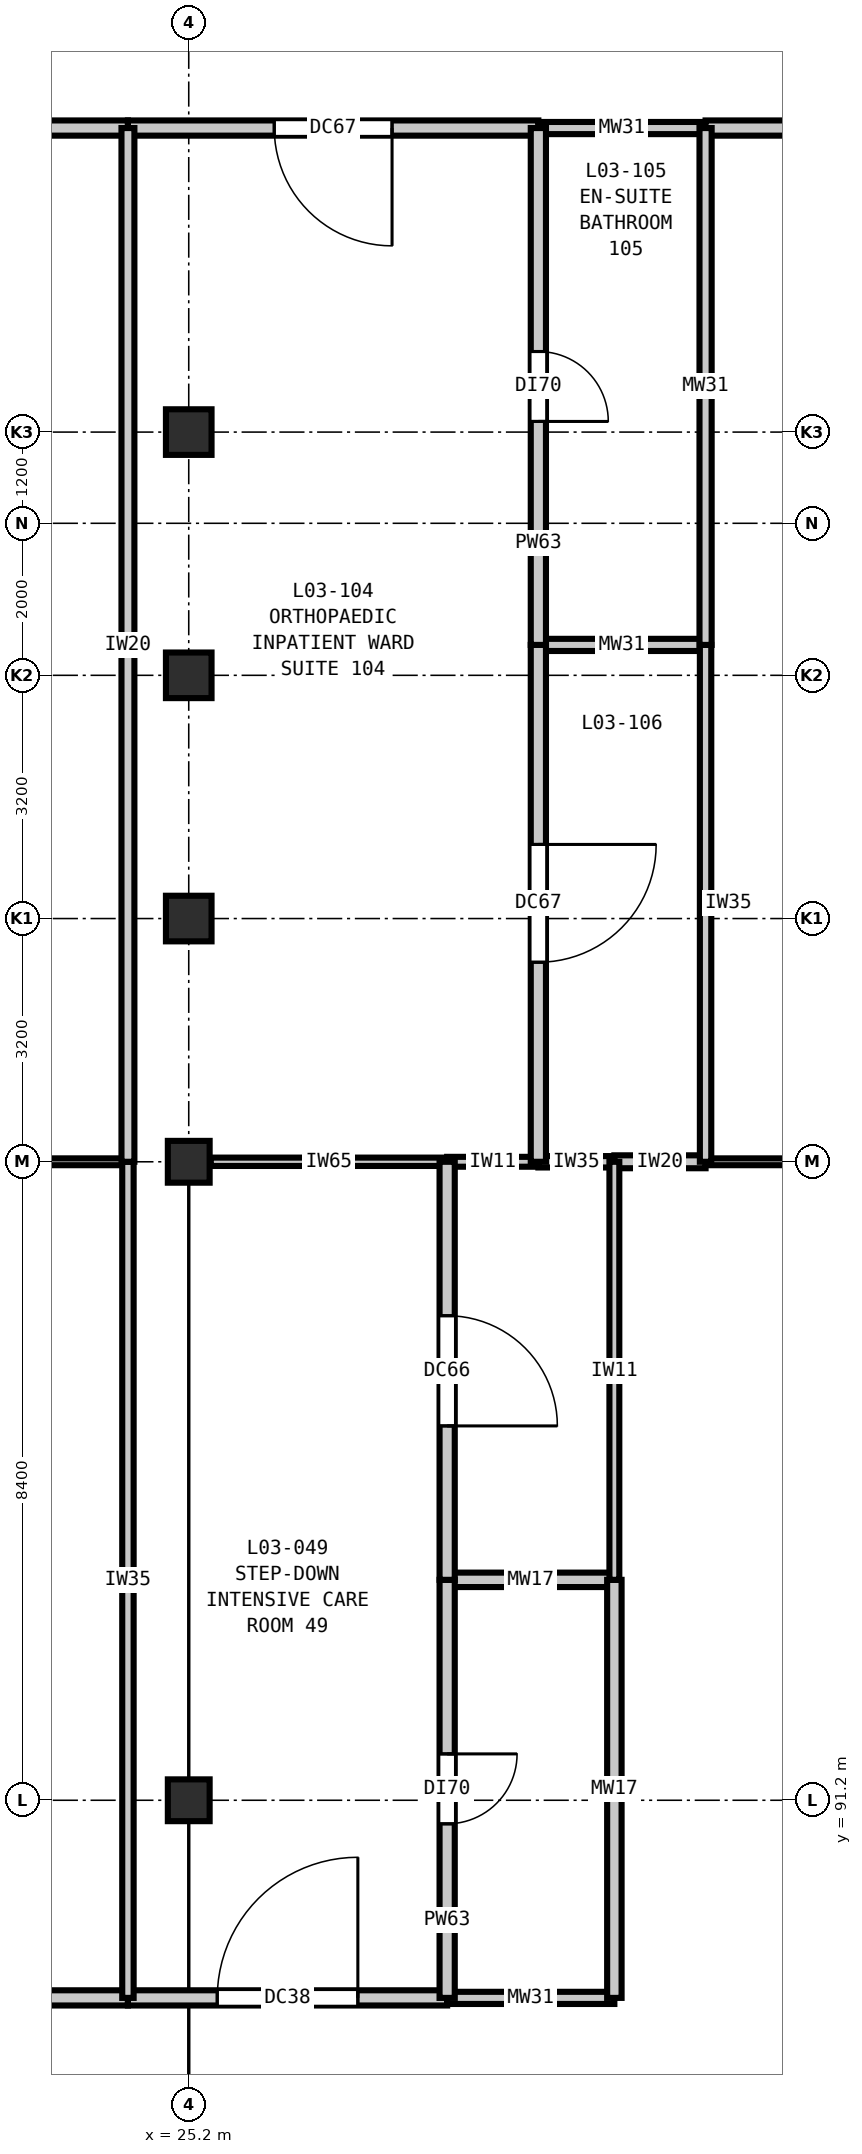
"""IFC4 building model, lengths in metres.
Left out: names, types, materials, properties, quantities, classifications, styles, units other than length and angle.
Written with IfcOpenShell. Run it as: python <this file> out.ifc"""

import sys

from ifc_helpers import new_model, si_unit, direction, frame, frame_2d, origin, origin_2d, place, context, subcontext, project, spatial, rectangle, extrude, element, fill, save


model = new_model("IFC4")
c1 = context("Model", 3, precision=1e-05, world=origin(), true_north=direction((0.0, 1.0)))
c2 = subcontext(c1, "Body", "Model", "MODEL_VIEW")
j1 = project(units=[si_unit("LENGTHUNIT", "METRE"), si_unit("PLANEANGLEUNIT", "RADIAN")], contexts=[c1])
p1 = place(None, origin())
s1 = spatial("IfcSite", under=j1, at=p1, CompositionType="ELEMENT")
p2 = place(p1, origin())
s2 = spatial("IfcBuilding", under=s1, at=p2, CompositionType="ELEMENT")
p3 = place(p2, frame((0.0, 0.0, 16.2)))
s3 = spatial("IfcBuildingStorey", under=s2, at=p3, CompositionType="ELEMENT", Elevation=16.2)
for number, where, z_axis, x_axis in (
    (1, (25.2, 91.2, 0.0), (0.0, 0.0, 1.0), (1.0, 0.0, 0.0)),
    (2, (25.2, 99.6, 0.0), (0.0, 0.0, 1.0), (1.0, 0.0, 0.0)),
):
    element("IfcColumn", number, at=place(p3, frame(where, z_axis=z_axis, x_axis=x_axis)), inside=s3, PredefinedType="COLUMN", context=c2, shape_type="SweptSolid", body=[
        extrude(rectangle(XDim=0.55, YDim=0.55, at=origin_2d()), origin(), (0.0, 0.0, 1.0), 4.2),
    ])
for number, where, z_axis, x_axis in (
    (3, (25.2, 102.8, 0.0), (0.0, 0.0, 1.0), (1.0, 0.0, 0.0)),
    (4, (25.2, 106.0, 0.0), (0.0, 0.0, 1.0), (1.0, 0.0, 0.0)),
    (5, (25.2, 109.2, 0.0), (0.0, 0.0, 1.0), (1.0, 0.0, 0.0)),
):
    element("IfcColumn", number, at=place(p3, frame(where, z_axis=z_axis, x_axis=x_axis)), inside=s3, PredefinedType="COLUMN", context=c2, shape_type="SweptSolid", body=[
        extrude(rectangle(XDim=0.6, YDim=0.6, at=origin_2d()), origin(), (0.0, 0.0, 1.0), 4.2),
    ])
p4 = place(p3, frame((16.0, 88.6, 0.0), z_axis=(0.0, 0.0, 1.0), x_axis=(1.0, 0.0, 0.0)))
e6 = element("IfcWall", 6, at=p4, inside=s3, PredefinedType="PARTITIONING", context=c2, shape_type="SweptSolid", body=[
    extrude(rectangle(XDim=8.4, YDim=0.2, at=frame_2d((4.2, 0.0))), origin(), (0.0, 0.0, 1.0), 3.89),
])
p5 = place(p4, frame((3.35, 0.0, 0.0)))
e7 = element("IfcOpeningElement", 7, at=p5, cuts=e6, PredefinedType="OPENING", context=c2, shape_type="SweptSolid", body=[
    extrude(rectangle(XDim=1.7, YDim=2.3, at=frame_2d((0.85, 1.15))), frame((0.0, 0.11, 0.0), z_axis=(0.0, -1.0, 0.0), x_axis=(1.0, 0.0, 0.0)), (0.0, 0.0, 1.0), 0.22),
])
p6 = place(p3, frame((24.4, 88.6, 0.0), z_axis=(0.0, 0.0, 1.0), x_axis=(1.0, 0.0, 0.0)))
e8 = element("IfcWall", 8, at=p6, inside=s3, PredefinedType="PARTITIONING", context=c2, shape_type="SweptSolid", body=[
    extrude(rectangle(XDim=4.2, YDim=0.2, at=frame_2d((2.1, 0.0))), origin(), (0.0, 0.0, 1.0), 3.89),
])
p7 = place(p6, frame((1.175, 0.0, 0.0)))
e9 = element("IfcOpeningElement", 9, at=p7, cuts=e8, PredefinedType="OPENING", context=c2, shape_type="SweptSolid", body=[
    extrude(rectangle(XDim=1.85, YDim=2.3, at=frame_2d((0.925, 1.15))), frame((0.0, 0.11, 0.0), z_axis=(0.0, -1.0, 0.0), x_axis=(1.0, 0.0, 0.0)), (0.0, 0.0, 1.0), 0.22),
])
p8 = place(p3, frame((28.6, 88.6, 0.0), z_axis=(0.0, 0.0, 1.0), x_axis=(1.0, 0.0, 0.0)))
e10 = element("IfcWall", 10, at=p8, inside=s3, PredefinedType="PLUMBINGWALL", context=c2, shape_type="SweptSolid", body=[
    extrude(rectangle(XDim=2.2, YDim=0.16, at=frame_2d((1.1, 0.0))), origin(), (0.0, 0.0, 1.0), 3.89),
])
p9 = place(p3, frame((28.6, 94.1, 0.0), z_axis=(0.0, 0.0, 1.0), x_axis=(1.0, 0.0, 0.0)))
e11 = element("IfcWall", 11, at=p9, inside=s3, PredefinedType="PLUMBINGWALL", context=c2, shape_type="SweptSolid", body=[
    extrude(rectangle(XDim=2.2, YDim=0.19, at=frame_2d((1.1, 0.0))), origin(), (0.0, 0.0, 1.0), 3.89),
])
p10 = place(p3, frame((17.115, 99.6, 0.0), z_axis=(0.0, 0.0, 1.0), x_axis=(1.0, 0.0, 0.0)))
e12 = element("IfcWall", 12, at=p10, inside=s3, PredefinedType="PARTITIONING", context=c2, shape_type="SweptSolid", body=[
    extrude(rectangle(XDim=7.285, YDim=0.09, at=frame_2d((3.643, 0.0))), origin(), (0.0, 0.0, 1.0), 3.535),
])
p11 = place(p3, frame((25.49, 99.6, 0.0), z_axis=(0.0, 0.0, 1.0), x_axis=(1.0, 0.0, 0.0)))
e13 = element("IfcWall", 13, at=p11, inside=s3, PredefinedType="PARTITIONING", context=c2, shape_type="SweptSolid", body=[
    extrude(rectangle(XDim=3.11, YDim=0.11, at=frame_2d((1.555, 0.0))), origin(), (0.0, 0.0, 1.0), 3.535),
])
p12 = place(p3, frame((28.6, 99.6, 0.0), z_axis=(0.0, 0.0, 1.0), x_axis=(1.0, 0.0, 0.0)))
e14 = element("IfcWall", 14, at=p12, inside=s3, PredefinedType="PARTITIONING", context=c2, shape_type="SweptSolid", body=[
    extrude(rectangle(XDim=1.2, YDim=0.13, at=frame_2d((0.6, 0.0))), origin(), (0.0, 0.0, 1.0), 3.535),
])
p13 = place(p3, frame((29.8, 99.6, 0.0), z_axis=(0.0, 0.0, 1.0), x_axis=(1.0, 0.0, 0.0)))
e15 = element("IfcWall", 15, at=p13, inside=s3, PredefinedType="PARTITIONING", context=c2, shape_type="SweptSolid", body=[
    extrude(rectangle(XDim=1.0, YDim=0.15, at=frame_2d((0.5, 0.0))), origin(), (0.0, 0.0, 1.0), 3.535),
])
p14 = place(p3, frame((30.8, 99.6, 0.0), z_axis=(0.0, 0.0, 1.0), x_axis=(1.0, 0.0, 0.0)))
e16 = element("IfcWall", 16, at=p14, inside=s3, PredefinedType="PARTITIONING", context=c2, shape_type="SweptSolid", body=[
    extrude(rectangle(XDim=1.2, YDim=0.17, at=frame_2d((0.6, 0.0))), origin(), (0.0, 0.0, 1.0), 3.535),
])
p15 = place(p3, frame((32.0, 99.6, 0.0), z_axis=(0.0, 0.0, 1.0), x_axis=(1.0, 0.0, 0.0)))
e17 = element("IfcWall", 17, at=p15, inside=s3, PredefinedType="PARTITIONING", context=c2, shape_type="SweptSolid", body=[
    extrude(rectangle(XDim=1.31, YDim=0.09, at=frame_2d((0.655, 0.0))), origin(), (0.0, 0.0, 1.0), 3.535),
])
p16 = place(p3, frame((29.8, 106.4, 0.0), z_axis=(0.0, 0.0, 1.0), x_axis=(1.0, 0.0, 0.0)))
e18 = element("IfcWall", 18, at=p16, inside=s3, PredefinedType="PLUMBINGWALL", context=c2, shape_type="SweptSolid", body=[
    extrude(rectangle(XDim=2.2, YDim=0.16, at=frame_2d((1.1, 0.0))), origin(), (0.0, 0.0, 1.0), 3.89),
])
p17 = place(p3, frame((16.0, 113.2, 0.0), z_axis=(0.0, 0.0, 1.0), x_axis=(1.0, 0.0, 0.0)))
e19 = element("IfcWall", 19, at=p17, inside=s3, PredefinedType="PARTITIONING", context=c2, shape_type="SweptSolid", body=[
    extrude(rectangle(XDim=8.4, YDim=0.2, at=frame_2d((4.2, 0.0))), origin(), (0.0, 0.0, 1.0), 3.89),
])
p18 = place(p17, frame((3.475, 0.0, 0.0)))
e20 = element("IfcOpeningElement", 20, at=p18, cuts=e19, PredefinedType="OPENING", context=c2, shape_type="SweptSolid", body=[
    extrude(rectangle(XDim=1.45, YDim=2.25, at=frame_2d((0.725, 1.125))), frame((0.0, 0.11, 0.0), z_axis=(0.0, -1.0, 0.0), x_axis=(1.0, 0.0, 0.0)), (0.0, 0.0, 1.0), 0.22),
])
p19 = place(p3, frame((24.4, 113.2, 0.0), z_axis=(0.0, 0.0, 1.0), x_axis=(1.0, 0.0, 0.0)))
e21 = element("IfcWall", 21, at=p19, inside=s3, PredefinedType="PARTITIONING", context=c2, shape_type="SweptSolid", body=[
    extrude(rectangle(XDim=5.4, YDim=0.2, at=frame_2d((2.7, 0.0))), origin(), (0.0, 0.0, 1.0), 3.89),
])
p20 = place(p19, frame((1.925, 0.0, 0.0)))
e22 = element("IfcOpeningElement", 22, at=p20, cuts=e21, PredefinedType="OPENING", context=c2, shape_type="SweptSolid", body=[
    extrude(rectangle(XDim=1.55, YDim=2.25, at=frame_2d((0.775, 1.125))), frame((0.0, 0.11, 0.0), z_axis=(0.0, -1.0, 0.0), x_axis=(1.0, 0.0, 0.0)), (0.0, 0.0, 1.0), 0.22),
])
p21 = place(p3, frame((29.8, 113.2, 0.0), z_axis=(0.0, 0.0, 1.0), x_axis=(1.0, 0.0, 0.0)))
e23 = element("IfcWall", 23, at=p21, inside=s3, PredefinedType="PLUMBINGWALL", context=c2, shape_type="SweptSolid", body=[
    extrude(rectangle(XDim=2.2, YDim=0.16, at=frame_2d((1.1, 0.0))), origin(), (0.0, 0.0, 1.0), 3.89),
])
p22 = place(p3, frame((32.0, 113.2, 0.0), z_axis=(0.0, 0.0, 1.0), x_axis=(1.0, 0.0, 0.0)))
e24 = element("IfcWall", 24, at=p22, inside=s3, PredefinedType="PARTITIONING", context=c2, shape_type="SweptSolid", body=[
    extrude(rectangle(XDim=8.4, YDim=0.2, at=frame_2d((4.2, 0.0))), origin(), (0.0, 0.0, 1.0), 3.89),
])
p23 = place(p22, frame((3.35, 0.0, 0.0)))
e25 = element("IfcOpeningElement", 25, at=p23, cuts=e24, PredefinedType="OPENING", context=c2, shape_type="SweptSolid", body=[
    extrude(rectangle(XDim=1.7, YDim=2.3, at=frame_2d((0.85, 1.15))), frame((0.0, 0.11, 0.0), z_axis=(0.0, -1.0, 0.0), x_axis=(1.0, 0.0, 0.0)), (0.0, 0.0, 1.0), 0.22),
])
p24 = place(p3, frame((24.4, 88.6, 0.0), z_axis=(0.0, 0.0, 1.0), x_axis=(0.0, 1.0, 0.0)))
e26 = element("IfcWall", 26, at=p24, inside=s3, PredefinedType="PARTITIONING", context=c2, shape_type="SweptSolid", body=[
    extrude(rectangle(XDim=11.0, YDim=0.15, at=frame_2d((5.5, 0.0))), origin(), (0.0, 0.0, 1.0), 3.89),
])
p25 = place(p3, frame((24.4, 99.6, 0.0), z_axis=(0.0, 0.0, 1.0), x_axis=(0.0, 1.0, 0.0)))
e27 = element("IfcWall", 27, at=p25, inside=s3, PredefinedType="PARTITIONING", context=c2, shape_type="SweptSolid", body=[
    extrude(rectangle(XDim=13.6, YDim=0.17, at=frame_2d((6.8, 0.0))), origin(), (0.0, 0.0, 1.0), 3.89),
])
p26 = place(p3, frame((28.6, 88.6, 0.0), z_axis=(0.0, 0.0, 1.0), x_axis=(0.0, 1.0, 0.0)))
e28 = element("IfcWall", 28, at=p26, inside=s3, PredefinedType="PARTITIONING", context=c2, shape_type="SweptSolid", body=[
    extrude(rectangle(XDim=5.5, YDim=0.2, at=frame_2d((2.75, 0.0))), origin(), (0.0, 0.0, 1.0), 3.89),
])
p27 = place(p26, frame((2.29, 0.0, 0.0)))
e29 = element("IfcOpeningElement", 29, at=p27, cuts=e28, PredefinedType="OPENING", context=c2, shape_type="SweptSolid", body=[
    extrude(rectangle(XDim=0.92, YDim=2.1, at=frame_2d((0.46, 1.05))), frame((0.0, 0.11, 0.0), z_axis=(0.0, -1.0, 0.0), x_axis=(1.0, 0.0, 0.0)), (0.0, 0.0, 1.0), 0.22),
])
p28 = place(p3, frame((28.6, 94.1, 0.0), z_axis=(0.0, 0.0, 1.0), x_axis=(0.0, 1.0, 0.0)))
e30 = element("IfcWall", 30, at=p28, inside=s3, PredefinedType="PARTITIONING", context=c2, shape_type="SweptSolid", body=[
    extrude(rectangle(XDim=5.5, YDim=0.2, at=frame_2d((2.75, 0.0))), origin(), (0.0, 0.0, 1.0), 3.89),
])
p29 = place(p28, frame((2.025, 0.0, 0.0)))
e31 = element("IfcOpeningElement", 31, at=p29, cuts=e30, PredefinedType="OPENING", context=c2, shape_type="SweptSolid", body=[
    extrude(rectangle(XDim=1.45, YDim=2.25, at=frame_2d((0.725, 1.125))), frame((0.0, 0.11, 0.0), z_axis=(0.0, -1.0, 0.0), x_axis=(1.0, 0.0, 0.0)), (0.0, 0.0, 1.0), 0.22),
])
p30 = place(p3, frame((29.8, 99.6, 0.0), z_axis=(0.0, 0.0, 1.0), x_axis=(0.0, 1.0, 0.0)))
e32 = element("IfcWall", 32, at=p30, inside=s3, PredefinedType="PARTITIONING", context=c2, shape_type="SweptSolid", body=[
    extrude(rectangle(XDim=6.8, YDim=0.2, at=frame_2d((3.4, 0.0))), origin(), (0.0, 0.0, 1.0), 3.89),
])
p31 = place(p30, frame((2.625, 0.0, 0.0)))
e33 = element("IfcOpeningElement", 33, at=p31, cuts=e32, PredefinedType="OPENING", context=c2, shape_type="SweptSolid", body=[
    extrude(rectangle(XDim=1.55, YDim=2.25, at=frame_2d((0.775, 1.125))), frame((0.0, 0.11, 0.0), z_axis=(0.0, -1.0, 0.0), x_axis=(1.0, 0.0, 0.0)), (0.0, 0.0, 1.0), 0.22),
])
p32 = place(p3, frame((29.8, 106.4, 0.0), z_axis=(0.0, 0.0, 1.0), x_axis=(0.0, 1.0, 0.0)))
e34 = element("IfcWall", 34, at=p32, inside=s3, PredefinedType="PARTITIONING", context=c2, shape_type="SweptSolid", body=[
    extrude(rectangle(XDim=6.8, YDim=0.2, at=frame_2d((3.4, 0.0))), origin(), (0.0, 0.0, 1.0), 3.89),
])
p33 = place(p32, frame((2.94, 0.0, 0.0)))
e35 = element("IfcOpeningElement", 35, at=p33, cuts=e34, PredefinedType="OPENING", context=c2, shape_type="SweptSolid", body=[
    extrude(rectangle(XDim=0.92, YDim=2.1, at=frame_2d((0.46, 1.05))), frame((0.0, 0.11, 0.0), z_axis=(0.0, -1.0, 0.0), x_axis=(1.0, 0.0, 0.0)), (0.0, 0.0, 1.0), 0.22),
])
p34 = place(p3, frame((30.8, 88.6, 0.0), z_axis=(0.0, 0.0, 1.0), x_axis=(0.0, 1.0, 0.0)))
e36 = element("IfcWall", 36, at=p34, inside=s3, PredefinedType="PLUMBINGWALL", context=c2, shape_type="SweptSolid", body=[
    extrude(rectangle(XDim=5.5, YDim=0.19, at=frame_2d((2.75, 0.0))), origin(), (0.0, 0.0, 1.0), 3.89),
])
p35 = place(p3, frame((30.8, 94.1, 0.0), z_axis=(0.0, 0.0, 1.0), x_axis=(0.0, 1.0, 0.0)))
e37 = element("IfcWall", 37, at=p35, inside=s3, PredefinedType="PARTITIONING", context=c2, shape_type="SweptSolid", body=[
    extrude(rectangle(XDim=5.5, YDim=0.13, at=frame_2d((2.75, 0.0))), origin(), (0.0, 0.0, 1.0), 3.89),
])
p36 = place(p3, frame((32.0, 99.6, 0.0), z_axis=(0.0, 0.0, 1.0), x_axis=(0.0, 1.0, 0.0)))
e38 = element("IfcWall", 38, at=p36, inside=s3, PredefinedType="PARTITIONING", context=c2, shape_type="SweptSolid", body=[
    extrude(rectangle(XDim=6.8, YDim=0.15, at=frame_2d((3.4, 0.0))), origin(), (0.0, 0.0, 1.0), 3.89),
])
p37 = place(p3, frame((32.0, 106.4, 0.0), z_axis=(0.0, 0.0, 1.0), x_axis=(0.0, 1.0, 0.0)))
e39 = element("IfcWall", 39, at=p37, inside=s3, PredefinedType="PLUMBINGWALL", context=c2, shape_type="SweptSolid", body=[
    extrude(rectangle(XDim=6.8, YDim=0.16, at=frame_2d((3.4, 0.0))), origin(), (0.0, 0.0, 1.0), 3.89),
])
p38 = place(p7, origin())
e40 = element("IfcDoor", 40, at=p38, inside=s3, OperationType="SINGLE_SWING_RIGHT", PredefinedType="DOOR", context=c2, shape_type="SweptSolid", body=[
    extrude(rectangle(XDim=1.85, YDim=2.3, at=frame_2d((0.925, 1.15))), frame((0.0, 0.025, 0.0), z_axis=(0.0, -1.0, 0.0), x_axis=(1.0, 0.0, 0.0)), (0.0, 0.0, 1.0), 0.05),
])
fill(e9, e40)
p39 = place(p20, frame((1.55, 0.0, 0.0), z_axis=(0.0, 0.0, 1.0), x_axis=(-1.0, 0.0, 0.0)))
e41 = element("IfcDoor", 41, at=p39, inside=s3, OperationType="SINGLE_SWING_LEFT", PredefinedType="DOOR", context=c2, shape_type="SweptSolid", body=[
    extrude(rectangle(XDim=1.55, YDim=2.25, at=frame_2d((0.775, 1.125))), frame((0.0, 0.025, 0.0), z_axis=(0.0, -1.0, 0.0), x_axis=(1.0, 0.0, 0.0)), (0.0, 0.0, 1.0), 0.05),
])
fill(e22, e41)
p40 = place(p27, frame((0.92, 0.0, 0.0), z_axis=(0.0, 0.0, 1.0), x_axis=(-1.0, 0.0, 0.0)))
e42 = element("IfcDoor", 42, at=p40, inside=s3, OperationType="SINGLE_SWING_LEFT", PredefinedType="DOOR", context=c2, shape_type="SweptSolid", body=[
    extrude(rectangle(XDim=0.92, YDim=2.1, at=frame_2d((0.46, 1.05))), frame((0.0, 0.025, 0.0), z_axis=(0.0, -1.0, 0.0), x_axis=(1.0, 0.0, 0.0)), (0.0, 0.0, 1.0), 0.05),
])
fill(e29, e42)
p41 = place(p29, frame((1.45, 0.0, 0.0), z_axis=(0.0, 0.0, 1.0), x_axis=(-1.0, 0.0, 0.0)))
e43 = element("IfcDoor", 43, at=p41, inside=s3, OperationType="SINGLE_SWING_RIGHT", PredefinedType="DOOR", context=c2, shape_type="SweptSolid", body=[
    extrude(rectangle(XDim=1.45, YDim=2.25, at=frame_2d((0.725, 1.125))), frame((0.0, 0.025, 0.0), z_axis=(0.0, -1.0, 0.0), x_axis=(1.0, 0.0, 0.0)), (0.0, 0.0, 1.0), 0.05),
])
fill(e31, e43)
p42 = place(p31, frame((1.55, 0.0, 0.0), z_axis=(0.0, 0.0, 1.0), x_axis=(-1.0, 0.0, 0.0)))
e44 = element("IfcDoor", 44, at=p42, inside=s3, OperationType="SINGLE_SWING_LEFT", PredefinedType="DOOR", context=c2, shape_type="SweptSolid", body=[
    extrude(rectangle(XDim=1.55, YDim=2.25, at=frame_2d((0.775, 1.125))), frame((0.0, 0.025, 0.0), z_axis=(0.0, -1.0, 0.0), x_axis=(1.0, 0.0, 0.0)), (0.0, 0.0, 1.0), 0.05),
])
fill(e33, e44)
p43 = place(p33, frame((0.92, 0.0, 0.0), z_axis=(0.0, 0.0, 1.0), x_axis=(-1.0, 0.0, 0.0)))
e45 = element("IfcDoor", 45, at=p43, inside=s3, OperationType="SINGLE_SWING_RIGHT", PredefinedType="DOOR", context=c2, shape_type="SweptSolid", body=[
    extrude(rectangle(XDim=0.92, YDim=2.1, at=frame_2d((0.46, 1.05))), frame((0.0, 0.025, 0.0), z_axis=(0.0, -1.0, 0.0), x_axis=(1.0, 0.0, 0.0)), (0.0, 0.0, 1.0), 0.05),
])
fill(e35, e45)
save(model, sys.argv[1])
